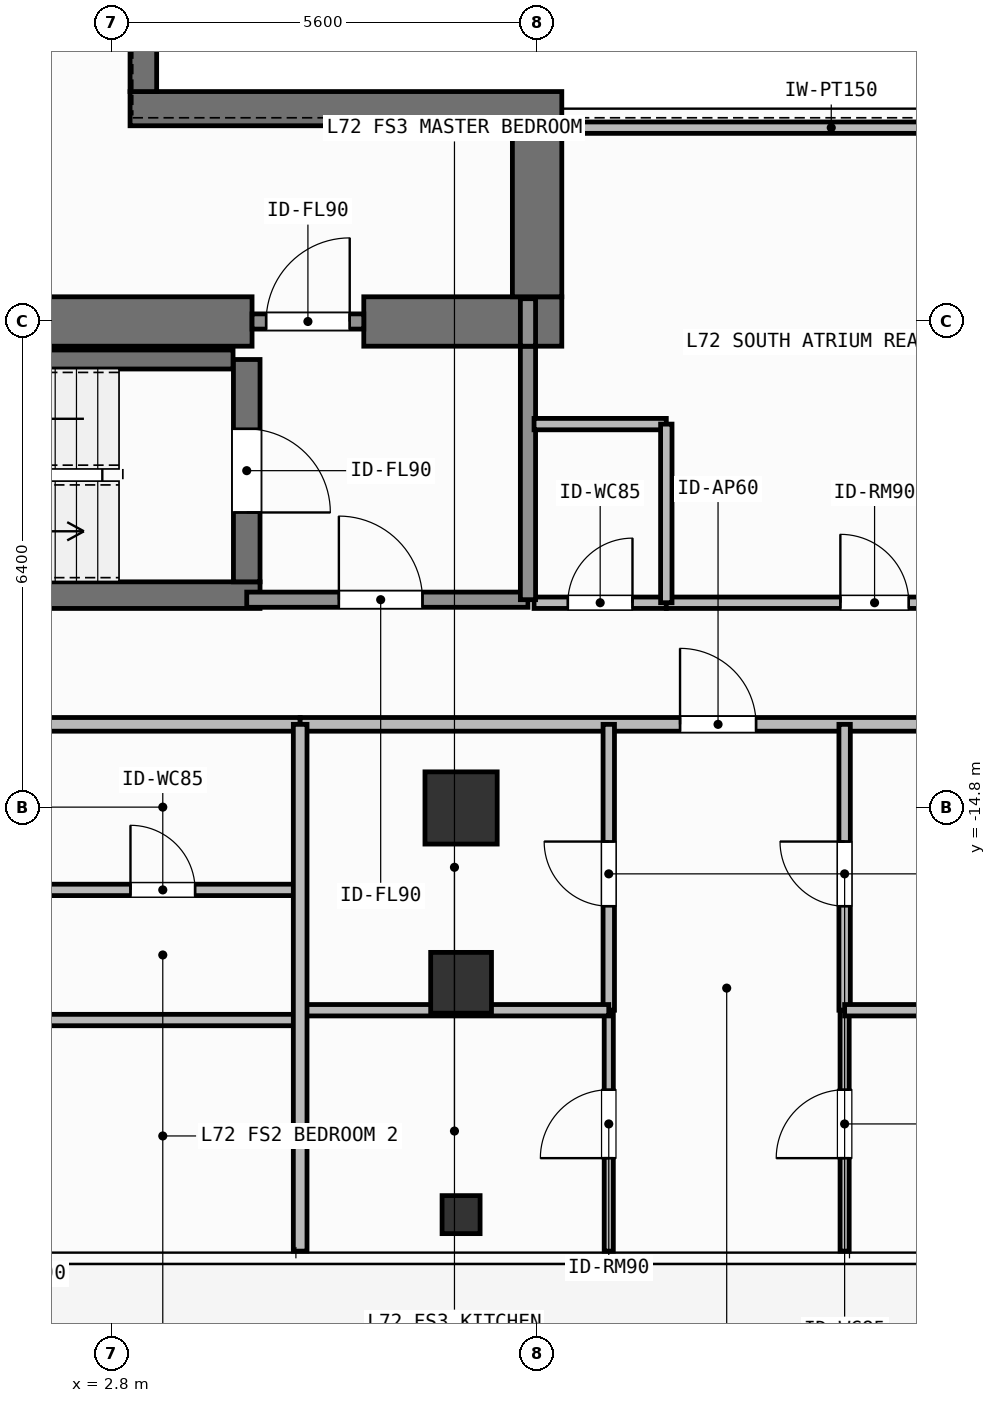
"""IFC4 building model, lengths in metres.
Left out: names, types, materials, properties, quantities, classifications, styles, units other than length and angle.
Written with IfcOpenShell. Run it as: python <this file> out.ifc"""

import sys

from ifc_helpers import new_model, si_unit, direction, frame, frame_2d, origin, origin_2d, place, context, subcontext, project, spatial, rectangle, hollow_rectangle, extrude, element, fill, save


model = new_model("IFC4")
c1 = context("Model", 3, precision=1e-05, world=origin(), true_north=direction((0.0, 1.0)))
c2 = subcontext(c1, "Body", "Model", "MODEL_VIEW")
j1 = project(units=[si_unit("LENGTHUNIT", "METRE"), si_unit("PLANEANGLEUNIT", "RADIAN")], contexts=[c1])
p1 = place(None, origin())
s1 = spatial("IfcSite", under=j1, at=p1, CompositionType="ELEMENT")
p2 = place(p1, origin())
s2 = spatial("IfcBuilding", under=s1, at=p2, CompositionType="ELEMENT")
p3 = place(p2, frame((0.0, 0.0, 293.7)))
s3 = spatial("IfcBuildingStorey", under=s2, at=p3, CompositionType="ELEMENT", Elevation=293.7)
p4 = place(p3, frame((-2.62, -8.4, 0.0), z_axis=(0.0, 0.0, 1.0), x_axis=(1.0, 0.0, 0.0)))
e1 = element("IfcWall", 1, at=p4, inside=s3, PredefinedType="SHEAR", context=c2, shape_type="SweptSolid", body=[
    extrude(rectangle(XDim=7.27, YDim=0.65, at=frame_2d((3.635, 0.0))), origin(), (0.0, 0.0, 1.0), 3.9),
])
p5 = place(p3, frame((6.12, -8.4, 0.0), z_axis=(0.0, 0.0, 1.0), x_axis=(1.0, 0.0, 0.0)))
e2 = element("IfcWall", 2, at=p5, inside=s3, PredefinedType="SHEAR", context=c2, shape_type="SweptSolid", body=[
    extrude(rectangle(XDim=2.605, YDim=0.65, at=frame_2d((1.302, 0.0))), origin(), (0.0, 0.0, 1.0), 3.9),
])
p6 = place(p3, frame((8.4, -8.075, 0.0), z_axis=(0.0, 0.0, 1.0), x_axis=(0.0, 1.0, 0.0)))
e3 = element("IfcWall", 3, at=p6, inside=s3, PredefinedType="SHEAR", context=c2, shape_type="SweptSolid", body=[
    extrude(rectangle(XDim=2.25, YDim=0.65, at=frame_2d((1.125, 0.0))), origin(), (0.0, 0.0, 1.0), 3.9),
])
p7 = place(p3, frame((3.045, -5.6, 0.0), z_axis=(0.0, 0.0, 1.0), x_axis=(1.0, 0.0, 0.0)))
e4 = element("IfcWall", 4, at=p7, inside=s3, PredefinedType="SHEAR", context=c2, shape_type="SweptSolid", body=[
    extrude(rectangle(XDim=5.68, YDim=0.45, at=frame_2d((2.84, 0.0))), origin(), (0.0, 0.0, 1.0), 3.9),
])
p8 = place(p3, frame((3.22, -5.375, 0.0), z_axis=(0.0, 0.0, 1.0), x_axis=(0.0, 1.0, 0.0)))
e5 = element("IfcWall", 5, at=p8, inside=s3, PredefinedType="SHEAR", context=c2, shape_type="SweptSolid", body=[
    extrude(rectangle(XDim=10.75, YDim=0.35, at=frame_2d((5.375, 0.0))), origin(), (0.0, 0.0, 1.0), 3.9),
])
p9 = place(p3, frame((-2.555, -12.0, 0.0), z_axis=(0.0, 0.0, 1.0), x_axis=(1.0, 0.0, 0.0)))
e6 = element("IfcWall", 6, at=p9, inside=s3, PredefinedType="SHEAR", context=c2, shape_type="SweptSolid", body=[
    extrude(rectangle(XDim=7.31, YDim=0.35, at=frame_2d((3.655, 0.0))), origin(), (0.0, 0.0, 1.0), 3.9),
])
p10 = place(p3, frame((-2.2, -8.9, 0.0), z_axis=(0.0, 0.0, 1.0), x_axis=(1.0, 0.0, 0.0)))
e7 = element("IfcWall", 7, at=p10, inside=s3, PredefinedType="SHEAR", context=c2, shape_type="SweptSolid", body=[
    extrude(rectangle(XDim=6.6, YDim=0.25, at=frame_2d((3.3, 0.0))), origin(), (0.0, 0.0, 1.0), 3.9),
])
p11 = place(p3, frame((4.58, -8.9, 0.0), z_axis=(0.0, 0.0, 1.0), x_axis=(0.0, -1.0, 0.0)))
e8 = element("IfcWall", 8, at=p11, inside=s3, PredefinedType="SHEAR", context=c2, shape_type="SweptSolid", body=[
    extrude(rectangle(XDim=2.925, YDim=0.35, at=frame_2d((1.462, 0.0))), origin(), (0.0, 0.0, 1.0), 3.9),
])
p12 = place(p11, frame((0.913, 0.0, 0.0)))
e9 = element("IfcOpeningElement", 9, at=p12, cuts=e8, PredefinedType="OPENING", context=c2, shape_type="SweptSolid", body=[
    extrude(rectangle(XDim=1.1, YDim=2.15, at=frame_2d((0.55, 1.075))), frame((0.0, 0.185, 0.0), z_axis=(0.0, -1.0, 0.0), x_axis=(1.0, 0.0, 0.0)), (0.0, 0.0, 1.0), 0.37),
])
p13 = place(p3, frame((7.4, -14.8, 0.0), z_axis=(0.0, 0.0, 1.0), x_axis=(1.0, 0.0, 0.0)))
e10 = element("IfcColumn", 10, at=p13, inside=s3, PredefinedType="COLUMN", context=c2, shape_type="SweptSolid", body=[
    extrude(rectangle(XDim=0.95, YDim=0.95, at=origin_2d()), origin(), (0.0, 0.0, 1.0), 3.9),
])
p14 = place(p3, frame((7.4, -17.1, 0.0), z_axis=(0.0, 0.0, 1.0), x_axis=(1.0, 0.0, 0.0)))
e11 = element("IfcColumn", 11, at=p14, inside=s3, PredefinedType="COLUMN", context=c2, shape_type="SweptSolid", body=[
    extrude(hollow_rectangle(XDim=0.8, YDim=0.8, WallThickness=0.036, at=origin_2d()), origin(), (0.0, 0.0, 1.0), 3.9),
])
p15 = place(p3, frame((7.4, -20.15, 0.0), z_axis=(0.0, 0.0, 1.0), x_axis=(1.0, 0.0, 0.0)))
e12 = element("IfcColumn", 12, at=p15, inside=s3, PredefinedType="COLUMN", context=c2, shape_type="SweptSolid", body=[
    extrude(hollow_rectangle(XDim=0.5, YDim=0.5, WallThickness=0.025, at=origin_2d()), origin(), (0.0, 0.0, 1.0), 3.9),
])
p16 = place(p3, frame((4.58, -12.06, 0.0), z_axis=(0.0, 0.0, 1.0), x_axis=(1.0, 0.0, 0.0)))
e13 = element("IfcWall", 13, at=p16, inside=s3, PredefinedType="SOLIDWALL", context=c2, shape_type="SweptSolid", body=[
    extrude(rectangle(XDim=3.7, YDim=0.2, at=frame_2d((1.85, 0.0))), origin(), (0.0, 0.0, 1.0), 3.68),
])
p17 = place(p16, frame((1.212, 0.0, 0.0)))
e14 = element("IfcOpeningElement", 14, at=p17, cuts=e13, PredefinedType="OPENING", context=c2, shape_type="SweptSolid", body=[
    extrude(rectangle(XDim=1.1, YDim=2.15, at=frame_2d((0.55, 1.075))), frame((0.0, 0.11, 0.0), z_axis=(0.0, -1.0, 0.0), x_axis=(1.0, 0.0, 0.0)), (0.0, 0.0, 1.0), 0.22),
])
p18 = place(p3, frame((4.65, -8.4, 0.0), z_axis=(0.0, 0.0, 1.0), x_axis=(1.0, 0.0, 0.0)))
e15 = element("IfcWall", 15, at=p18, inside=s3, PredefinedType="SOLIDWALL", context=c2, shape_type="SweptSolid", body=[
    extrude(rectangle(XDim=1.47, YDim=0.2, at=frame_2d((0.735, 0.0))), origin(), (0.0, 0.0, 1.0), 2.92),
])
p19 = place(p18, frame((0.185, 0.0, 0.0)))
e16 = element("IfcOpeningElement", 16, at=p19, cuts=e15, PredefinedType="OPENING", context=c2, shape_type="SweptSolid", body=[
    extrude(rectangle(XDim=1.1, YDim=2.15, at=frame_2d((0.55, 1.075))), frame((0.0, 0.11, 0.0), z_axis=(0.0, -1.0, 0.0), x_axis=(1.0, 0.0, 0.0)), (0.0, 0.0, 1.0), 0.22),
])
p20 = place(p3, frame((8.36, -12.1, 0.0), z_axis=(0.0, 0.0, 1.0), x_axis=(1.0, 0.0, 0.0)))
e17 = element("IfcWall", 17, at=p20, inside=s3, PredefinedType="PARTITIONING", context=c2, shape_type="SweptSolid", body=[
    extrude(rectangle(XDim=1.74, YDim=0.15, at=frame_2d((0.87, 0.0))), origin(), (0.0, 0.0, 1.0), 3.68),
])
p21 = place(p20, frame((0.445, 0.0, 0.0)))
e18 = element("IfcOpeningElement", 18, at=p21, cuts=e17, PredefinedType="OPENING", context=c2, shape_type="SweptSolid", body=[
    extrude(rectangle(XDim=0.85, YDim=2.1, at=frame_2d((0.425, 1.05))), frame((0.0, 0.085, 0.0), z_axis=(0.0, -1.0, 0.0), x_axis=(1.0, 0.0, 0.0)), (0.0, 0.0, 1.0), 0.17),
])
p22 = place(p3, frame((10.1, -12.1, 0.0), z_axis=(0.0, 0.0, 1.0), x_axis=(1.0, 0.0, 0.0)))
e19 = element("IfcWall", 19, at=p22, inside=s3, PredefinedType="PARTITIONING", context=c2, shape_type="SweptSolid", body=[
    extrude(rectangle(XDim=5.48, YDim=0.15, at=frame_2d((2.74, 0.0))), origin(), (0.0, 0.0, 1.0), 3.68),
])
p23 = place(p22, frame((2.29, 0.0, 0.0)))
e20 = element("IfcOpeningElement", 20, at=p23, cuts=e19, PredefinedType="OPENING", context=c2, shape_type="SweptSolid", body=[
    extrude(rectangle(XDim=0.9, YDim=2.1, at=frame_2d((0.45, 1.05))), frame((0.0, 0.085, 0.0), z_axis=(0.0, -1.0, 0.0), x_axis=(1.0, 0.0, 0.0)), (0.0, 0.0, 1.0), 0.17),
])
p24 = place(p3, frame((-10.04, -13.7, 0.0), z_axis=(0.0, 0.0, 1.0), x_axis=(1.0, 0.0, 0.0)))
e21 = element("IfcWall", 21, at=p24, inside=s3, PredefinedType="PARTITIONING", context=c2, shape_type="SweptSolid", body=[
    extrude(rectangle(XDim=15.323, YDim=0.18, at=frame_2d((7.662, 0.0))), origin(), (0.0, 0.0, 1.0), 3.68),
])
p25 = place(p24, frame((7.88, 0.0, 0.0)))
e22 = element("IfcOpeningElement", 22, at=p25, cuts=e21, PredefinedType="OPENING", context=c2, shape_type="SweptSolid", body=[
    extrude(rectangle(XDim=1.0, YDim=2.2, at=frame_2d((0.5, 1.1))), frame((0.0, 0.1, 0.0), z_axis=(0.0, -1.0, 0.0), x_axis=(1.0, 0.0, 0.0)), (0.0, 0.0, 1.0), 0.2),
])
p26 = place(p3, frame((5.283, -13.7, 0.0), z_axis=(0.0, 0.0, 1.0), x_axis=(1.0, 0.0, 0.0)))
e23 = element("IfcWall", 23, at=p26, inside=s3, PredefinedType="PARTITIONING", context=c2, shape_type="SweptSolid", body=[
    extrude(rectangle(XDim=10.637, YDim=0.18, at=frame_2d((5.318, 0.0))), origin(), (0.0, 0.0, 1.0), 3.68),
])
p27 = place(p26, frame((4.998, 0.0, 0.0)))
e24 = element("IfcOpeningElement", 24, at=p27, cuts=e23, PredefinedType="OPENING", context=c2, shape_type="SweptSolid", body=[
    extrude(rectangle(XDim=1.0, YDim=2.2, at=frame_2d((0.5, 1.1))), frame((0.0, 0.1, 0.0), z_axis=(0.0, -1.0, 0.0), x_axis=(1.0, 0.0, 0.0)), (0.0, 0.0, 1.0), 0.2),
])
p28 = place(p3, frame((9.343, -17.461, 0.0), z_axis=(0.0, 0.0, 1.0), x_axis=(0.0, 1.0, 0.0)))
e25 = element("IfcWall", 25, at=p28, inside=s3, PredefinedType="PARTITIONING", context=c2, shape_type="SweptSolid", body=[
    extrude(rectangle(XDim=3.761, YDim=0.15, at=frame_2d((1.88, 0.0))), origin(), (0.0, 0.0, 1.0), 3.68),
])
p29 = place(p28, frame((1.369, 0.0, 0.0)))
e26 = element("IfcOpeningElement", 26, at=p29, cuts=e25, PredefinedType="OPENING", context=c2, shape_type="SweptSolid", body=[
    extrude(rectangle(XDim=0.85, YDim=2.1, at=frame_2d((0.425, 1.05))), frame((0.0, 0.085, 0.0), z_axis=(0.0, -1.0, 0.0), x_axis=(1.0, 0.0, 0.0)), (0.0, 0.0, 1.0), 0.17),
])
p30 = place(p3, frame((9.343, -20.63, 0.0), z_axis=(0.0, 0.0, 1.0), x_axis=(0.0, 1.0, 0.0)))
e27 = element("IfcWall", 27, at=p30, inside=s3, PredefinedType="PARTITIONING", context=c2, shape_type="SweptSolid", body=[
    extrude(rectangle(XDim=3.169, YDim=0.12, at=frame_2d((1.584, 0.0))), origin(), (0.0, 0.0, 1.0), 3.68),
])
p31 = place(p30, frame((1.223, 0.0, 0.0)))
e28 = element("IfcOpeningElement", 28, at=p31, cuts=e27, PredefinedType="OPENING", context=c2, shape_type="SweptSolid", body=[
    extrude(rectangle(XDim=0.9, YDim=2.1, at=frame_2d((0.45, 1.05))), frame((0.0, 0.07, 0.0), z_axis=(0.0, -1.0, 0.0), x_axis=(1.0, 0.0, 0.0)), (0.0, 0.0, 1.0), 0.14),
])
p32 = place(p3, frame((12.446, -17.461, 0.0), z_axis=(0.0, 0.0, 1.0), x_axis=(0.0, 1.0, 0.0)))
e29 = element("IfcWall", 29, at=p32, inside=s3, PredefinedType="PARTITIONING", context=c2, shape_type="SweptSolid", body=[
    extrude(rectangle(XDim=3.761, YDim=0.15, at=frame_2d((1.88, 0.0))), origin(), (0.0, 0.0, 1.0), 3.68),
])
p33 = place(p32, frame((1.369, 0.0, 0.0)))
e30 = element("IfcOpeningElement", 30, at=p33, cuts=e29, PredefinedType="OPENING", context=c2, shape_type="SweptSolid", body=[
    extrude(rectangle(XDim=0.85, YDim=2.1, at=frame_2d((0.425, 1.05))), frame((0.0, 0.085, 0.0), z_axis=(0.0, -1.0, 0.0), x_axis=(1.0, 0.0, 0.0)), (0.0, 0.0, 1.0), 0.17),
])
p34 = place(p3, frame((12.446, -20.63, 0.0), z_axis=(0.0, 0.0, 1.0), x_axis=(0.0, 1.0, 0.0)))
e31 = element("IfcWall", 31, at=p34, inside=s3, PredefinedType="PARTITIONING", context=c2, shape_type="SweptSolid", body=[
    extrude(rectangle(XDim=3.169, YDim=0.12, at=frame_2d((1.584, 0.0))), origin(), (0.0, 0.0, 1.0), 3.68),
])
p35 = place(p34, frame((1.223, 0.0, 0.0)))
e32 = element("IfcOpeningElement", 32, at=p35, cuts=e31, PredefinedType="OPENING", context=c2, shape_type="SweptSolid", body=[
    extrude(rectangle(XDim=0.9, YDim=2.1, at=frame_2d((0.45, 1.05))), frame((0.0, 0.07, 0.0), z_axis=(0.0, -1.0, 0.0), x_axis=(1.0, 0.0, 0.0)), (0.0, 0.0, 1.0), 0.14),
])
p36 = place(p3, frame((8.28, -12.06, 0.0), z_axis=(0.0, 0.0, 1.0), x_axis=(0.0, 1.0, 0.0)))
e33 = element("IfcWall", 33, at=p36, inside=s3, PredefinedType="SOLIDWALL", context=c2, shape_type="SweptSolid", body=[
    extrude(rectangle(XDim=3.335, YDim=0.2, at=frame_2d((1.667, 0.0))), origin(), (0.0, 0.0, 1.0), 3.68),
])
p37 = place(p3, frame((8.28, -8.725, 0.0), z_axis=(0.0, 0.0, 1.0), x_axis=(0.0, 1.0, 0.0)))
e34 = element("IfcWall", 34, at=p37, inside=s3, PredefinedType="SOLIDWALL", context=c2, shape_type="SweptSolid", body=[
    extrude(rectangle(XDim=0.625, YDim=0.2, at=frame_2d((0.312, 0.0))), origin(), (0.0, 0.0, 1.0), 3.68),
])
p38 = place(p3, frame((8.36, -9.75, 0.0), z_axis=(0.0, 0.0, 1.0), x_axis=(1.0, 0.0, 0.0)))
e35 = element("IfcWall", 35, at=p38, inside=s3, PredefinedType="PARTITIONING", context=c2, shape_type="SweptSolid", body=[
    extrude(rectangle(XDim=1.74, YDim=0.15, at=frame_2d((0.87, 0.0))), origin(), (0.0, 0.0, 1.0), 3.68),
])
p39 = place(p3, frame((10.1, -12.1, 0.0), z_axis=(0.0, 0.0, 1.0), x_axis=(0.0, 1.0, 0.0)))
e36 = element("IfcWall", 36, at=p39, inside=s3, PredefinedType="PARTITIONING", context=c2, shape_type="SweptSolid", body=[
    extrude(rectangle(XDim=2.35, YDim=0.15, at=frame_2d((1.175, 0.0))), origin(), (0.0, 0.0, 1.0), 3.68),
])
p40 = place(p3, frame((8.96, -5.85, 0.0), z_axis=(0.0, 0.0, 1.0), x_axis=(1.0, 0.0, 0.0)))
e37 = element("IfcWall", 37, at=p40, inside=s3, PredefinedType="PARTITIONING", context=c2, shape_type="SweptSolid", body=[
    extrude(rectangle(XDim=6.62, YDim=0.15, at=frame_2d((3.31, 0.0))), origin(), (0.0, 0.0, 1.0), 3.68),
])
p41 = place(p3, frame((1.668, -15.878, 0.0), z_axis=(0.0, 0.0, 1.0), x_axis=(1.0, 0.0, 0.0)))
e38 = element("IfcWall", 38, at=p41, inside=s3, PredefinedType="PARTITIONING", context=c2, shape_type="SweptSolid", body=[
    extrude(rectangle(XDim=3.615, YDim=0.15, at=frame_2d((1.808, 0.0))), origin(), (0.0, 0.0, 1.0), 3.68),
])
p42 = place(p41, frame((1.383, 0.0, 0.0)))
e39 = element("IfcOpeningElement", 39, at=p42, cuts=e38, PredefinedType="OPENING", context=c2, shape_type="SweptSolid", body=[
    extrude(rectangle(XDim=0.85, YDim=2.1, at=frame_2d((0.425, 1.05))), frame((0.0, 0.085, 0.0), z_axis=(0.0, -1.0, 0.0), x_axis=(1.0, 0.0, 0.0)), (0.0, 0.0, 1.0), 0.17),
])
p43 = place(p3, frame((1.668, -17.59, 0.0), z_axis=(0.0, 0.0, 1.0), x_axis=(1.0, 0.0, 0.0)))
e40 = element("IfcWall", 40, at=p43, inside=s3, PredefinedType="PARTITIONING", context=c2, shape_type="SweptSolid", body=[
    extrude(rectangle(XDim=3.615, YDim=0.15, at=frame_2d((1.808, 0.0))), origin(), (0.0, 0.0, 1.0), 3.68),
])
p44 = place(p3, frame((5.283, -17.461, 0.0), z_axis=(0.0, 0.0, 1.0), x_axis=(1.0, 0.0, 0.0)))
e41 = element("IfcWall", 41, at=p44, inside=s3, PredefinedType="PARTITIONING", context=c2, shape_type="SweptSolid", body=[
    extrude(rectangle(XDim=4.06, YDim=0.15, at=frame_2d((2.03, 0.0))), origin(), (0.0, 0.0, 1.0), 3.68),
])
p45 = place(p3, frame((12.446, -17.461, 0.0), z_axis=(0.0, 0.0, 1.0), x_axis=(1.0, 0.0, 0.0)))
e42 = element("IfcWall", 42, at=p45, inside=s3, PredefinedType="PARTITIONING", context=c2, shape_type="SweptSolid", body=[
    extrude(rectangle(XDim=3.474, YDim=0.15, at=frame_2d((1.737, 0.0))), origin(), (0.0, 0.0, 1.0), 3.68),
])
p46 = place(p3, frame((5.283, -20.63, 0.0), z_axis=(0.0, 0.0, 1.0), x_axis=(0.0, 1.0, 0.0)))
e43 = element("IfcWall", 43, at=p46, inside=s3, PredefinedType="PARTITIONING", context=c2, shape_type="SweptSolid", body=[
    extrude(rectangle(XDim=6.93, YDim=0.18, at=frame_2d((3.465, 0.0))), origin(), (0.0, 0.0, 1.0), 3.68),
])
p47 = place(p12, origin())
e44 = element("IfcDoor", 44, at=p47, inside=s3, OperationType="SINGLE_SWING_RIGHT", PredefinedType="DOOR", context=c2, shape_type="SweptSolid", body=[
    extrude(rectangle(XDim=1.1, YDim=2.15, at=frame_2d((0.55, 1.075))), frame((0.0, 0.025, 0.0), z_axis=(0.0, -1.0, 0.0), x_axis=(1.0, 0.0, 0.0)), (0.0, 0.0, 1.0), 0.05),
])
fill(e9, e44)
p48 = place(p17, origin())
e45 = element("IfcDoor", 45, at=p48, inside=s3, OperationType="SINGLE_SWING_LEFT", PredefinedType="DOOR", context=c2, shape_type="SweptSolid", body=[
    extrude(rectangle(XDim=1.1, YDim=2.15, at=frame_2d((0.55, 1.075))), frame((0.0, 0.025, 0.0), z_axis=(0.0, -1.0, 0.0), x_axis=(1.0, 0.0, 0.0)), (0.0, 0.0, 1.0), 0.05),
])
fill(e14, e45)
p49 = place(p19, origin())
e46 = element("IfcDoor", 46, at=p49, inside=s3, OperationType="SINGLE_SWING_RIGHT", PredefinedType="DOOR", context=c2, shape_type="SweptSolid", body=[
    extrude(rectangle(XDim=1.1, YDim=2.15, at=frame_2d((0.55, 1.075))), frame((0.0, 0.025, 0.0), z_axis=(0.0, -1.0, 0.0), x_axis=(1.0, 0.0, 0.0)), (0.0, 0.0, 1.0), 0.05),
])
fill(e16, e46)
p50 = place(p21, origin())
e47 = element("IfcDoor", 47, at=p50, inside=s3, OperationType="SINGLE_SWING_RIGHT", PredefinedType="DOOR", context=c2, shape_type="SweptSolid", body=[
    extrude(rectangle(XDim=0.85, YDim=2.1, at=frame_2d((0.425, 1.05))), frame((0.0, 0.025, 0.0), z_axis=(0.0, -1.0, 0.0), x_axis=(1.0, 0.0, 0.0)), (0.0, 0.0, 1.0), 0.05),
])
fill(e18, e47)
p51 = place(p23, origin())
e48 = element("IfcDoor", 48, at=p51, inside=s3, OperationType="SINGLE_SWING_LEFT", PredefinedType="DOOR", context=c2, shape_type="SweptSolid", body=[
    extrude(rectangle(XDim=0.9, YDim=2.1, at=frame_2d((0.45, 1.05))), frame((0.0, 0.025, 0.0), z_axis=(0.0, -1.0, 0.0), x_axis=(1.0, 0.0, 0.0)), (0.0, 0.0, 1.0), 0.05),
])
fill(e20, e48)
p52 = place(p42, origin())
e49 = element("IfcDoor", 49, at=p52, inside=s3, OperationType="SINGLE_SWING_LEFT", PredefinedType="DOOR", context=c2, shape_type="SweptSolid", body=[
    extrude(rectangle(XDim=0.85, YDim=2.1, at=frame_2d((0.425, 1.05))), frame((0.0, 0.025, 0.0), z_axis=(0.0, -1.0, 0.0), x_axis=(1.0, 0.0, 0.0)), (0.0, 0.0, 1.0), 0.05),
])
fill(e39, e49)
p53 = place(p27, origin())
e50 = element("IfcDoor", 50, at=p53, inside=s3, OperationType="SINGLE_SWING_LEFT", PredefinedType="DOOR", context=c2, shape_type="SweptSolid", body=[
    extrude(rectangle(XDim=1.0, YDim=2.2, at=frame_2d((0.5, 1.1))), frame((0.0, 0.025, 0.0), z_axis=(0.0, -1.0, 0.0), x_axis=(1.0, 0.0, 0.0)), (0.0, 0.0, 1.0), 0.05),
])
fill(e24, e50)
p54 = place(p29, origin())
e51 = element("IfcDoor", 51, at=p54, inside=s3, OperationType="SINGLE_SWING_RIGHT", PredefinedType="DOOR", context=c2, shape_type="SweptSolid", body=[
    extrude(rectangle(XDim=0.85, YDim=2.1, at=frame_2d((0.425, 1.05))), frame((0.0, 0.025, 0.0), z_axis=(0.0, -1.0, 0.0), x_axis=(1.0, 0.0, 0.0)), (0.0, 0.0, 1.0), 0.05),
])
fill(e26, e51)
p55 = place(p31, origin())
e52 = element("IfcDoor", 52, at=p55, inside=s3, OperationType="SINGLE_SWING_LEFT", PredefinedType="DOOR", context=c2, shape_type="SweptSolid", body=[
    extrude(rectangle(XDim=0.9, YDim=2.1, at=frame_2d((0.45, 1.05))), frame((0.0, 0.025, 0.0), z_axis=(0.0, -1.0, 0.0), x_axis=(1.0, 0.0, 0.0)), (0.0, 0.0, 1.0), 0.05),
])
fill(e28, e52)
p56 = place(p33, origin())
e53 = element("IfcDoor", 53, at=p56, inside=s3, OperationType="SINGLE_SWING_RIGHT", PredefinedType="DOOR", context=c2, shape_type="SweptSolid", body=[
    extrude(rectangle(XDim=0.85, YDim=2.1, at=frame_2d((0.425, 1.05))), frame((0.0, 0.025, 0.0), z_axis=(0.0, -1.0, 0.0), x_axis=(1.0, 0.0, 0.0)), (0.0, 0.0, 1.0), 0.05),
])
fill(e30, e53)
p57 = place(p35, origin())
e54 = element("IfcDoor", 54, at=p57, inside=s3, OperationType="SINGLE_SWING_LEFT", PredefinedType="DOOR", context=c2, shape_type="SweptSolid", body=[
    extrude(rectangle(XDim=0.9, YDim=2.1, at=frame_2d((0.45, 1.05))), frame((0.0, 0.025, 0.0), z_axis=(0.0, -1.0, 0.0), x_axis=(1.0, 0.0, 0.0)), (0.0, 0.0, 1.0), 0.05),
])
fill(e32, e54)
save(model, sys.argv[1])
